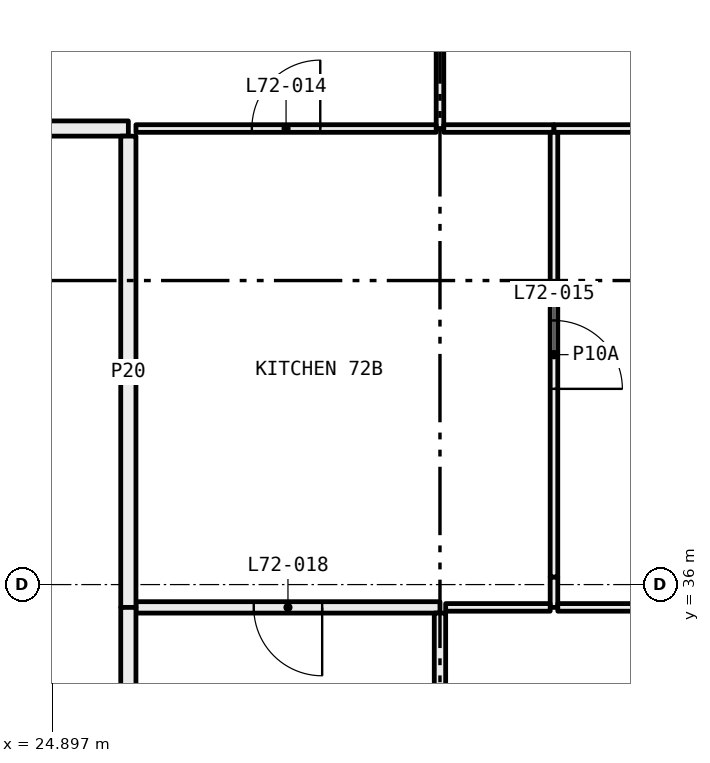
"""IFC4 building model, lengths in metres.
Left out: names, types, materials, properties, quantities, classifications, styles, units other than length and angle.
Written with IfcOpenShell. Run it as: python <this file> out.ifc"""

import sys

from ifc_helpers import new_model, si_unit, direction, frame, frame_2d, origin, place, context, subcontext, project, spatial, rectangle, extrude, element, fill, save


model = new_model("IFC4")
c1 = context("Model", 3, precision=1e-05, world=origin(), true_north=direction((0.0, 1.0)))
c2 = subcontext(c1, "Body", "Model", "MODEL_VIEW")
j1 = project(units=[si_unit("LENGTHUNIT", "METRE"), si_unit("PLANEANGLEUNIT", "RADIAN")], contexts=[c1])
p1 = place(None, origin())
s1 = spatial("IfcSite", under=j1, at=p1, CompositionType="ELEMENT")
p2 = place(p1, origin())
s2 = spatial("IfcBuilding", under=s1, at=p2, CompositionType="ELEMENT")
p3 = place(p2, frame((0.0, 0.0, 266.25)))
s3 = spatial("IfcBuildingStorey", under=s2, at=p3, CompositionType="ELEMENT", Elevation=266.25)
p4 = place(p3, frame((30.0, 42.0, 0.0), z_axis=(0.0, 0.0, 1.0), x_axis=(0.0, 1.0, 0.0)))
e1 = element("IfcWall", 1, at=p4, inside=s3, PredefinedType="PARTITIONING", context=c2, shape_type="SweptSolid", body=[
    extrude(rectangle(XDim=5.28, YDim=0.1, at=frame_2d((2.64, 0.0))), origin(), (0.0, 0.0, 1.0), 3.05),
])
p5 = place(p4, frame((2.19, 0.0, 0.0)))
e2 = element("IfcOpeningElement", 2, at=p5, cuts=e1, PredefinedType="OPENING", context=c2, shape_type="SweptSolid", body=[
    extrude(rectangle(XDim=0.9, YDim=2.1, at=frame_2d((0.45, 1.05))), frame((0.0, 0.06, 0.0), z_axis=(0.0, -1.0, 0.0), x_axis=(1.0, 0.0, 0.0)), (0.0, 0.0, 1.0), 0.12),
])
p6 = place(p3, frame((26.0, 42.0, 0.0), z_axis=(0.0, 0.0, 1.0), x_axis=(1.0, 0.0, 0.0)))
e3 = element("IfcWall", 3, at=p6, inside=s3, PredefinedType="PARTITIONING", context=c2, shape_type="SweptSolid", body=[
    extrude(rectangle(XDim=3.95, YDim=0.1, at=frame_2d((1.975, 0.0))), origin(), (0.0, 0.0, 1.0), 3.05),
])
p7 = place(p6, frame((1.525, 0.0, 0.0)))
e4 = element("IfcOpeningElement", 4, at=p7, cuts=e3, PredefinedType="OPENING", context=c2, shape_type="SweptSolid", body=[
    extrude(rectangle(XDim=0.9, YDim=2.1, at=frame_2d((0.45, 1.05))), frame((0.0, 0.06, 0.0), z_axis=(0.0, -1.0, 0.0), x_axis=(1.0, 0.0, 0.0)), (0.0, 0.0, 1.0), 0.12),
])
p8 = place(p3, frame((24.0, 42.0, 0.0), z_axis=(0.0, 0.0, 1.0), x_axis=(1.0, 0.0, 0.0)))
e5 = element("IfcWall", 5, at=p8, inside=s3, PredefinedType="PARTITIONING", context=c2, shape_type="SweptSolid", body=[
    extrude(rectangle(XDim=1.9, YDim=0.2, at=frame_2d((0.95, 0.0))), origin(), (0.0, 0.0, 1.0), 3.05),
])
p9 = place(p3, frame((30.05, 42.0, 0.0), z_axis=(0.0, 0.0, 1.0), x_axis=(1.0, 0.0, 0.0)))
e6 = element("IfcWall", 6, at=p9, inside=s3, PredefinedType="PARTITIONING", context=c2, shape_type="SweptSolid", body=[
    extrude(rectangle(XDim=1.45, YDim=0.1, at=frame_2d((0.725, 0.0))), origin(), (0.0, 0.0, 1.0), 3.05),
])
p10 = place(p3, frame((31.5, 42.0, 0.0), z_axis=(0.0, 0.0, 1.0), x_axis=(1.0, 0.0, 0.0)))
e7 = element("IfcWall", 7, at=p10, inside=s3, PredefinedType="PARTITIONING", context=c2, shape_type="SweptSolid", body=[
    extrude(rectangle(XDim=4.425, YDim=0.1, at=frame_2d((2.212, 0.0))), origin(), (0.0, 0.0, 1.0), 2.45),
])
p11 = place(p3, frame((31.5, 35.7, 0.0), z_axis=(0.0, 0.0, 1.0), x_axis=(0.0, 1.0, 0.0)))
e8 = element("IfcWall", 8, at=p11, inside=s3, PredefinedType="PARTITIONING", context=c2, shape_type="SweptSolid", body=[
    extrude(rectangle(XDim=0.4, YDim=0.1, at=frame_2d((0.2, 0.0))), origin(), (0.0, 0.0, 1.0), 2.45),
])
p12 = place(p3, frame((31.5, 36.1, 0.0), z_axis=(0.0, 0.0, 1.0), x_axis=(0.0, 1.0, 0.0)))
e9 = element("IfcWall", 9, at=p12, inside=s3, PredefinedType="PARTITIONING", context=c2, shape_type="SweptSolid", body=[
    extrude(rectangle(XDim=5.85, YDim=0.1, at=frame_2d((2.925, 0.0))), origin(), (0.0, 0.0, 1.0), 3.05),
])
p13 = place(p12, frame((2.475, 0.0, 0.0)))
e10 = element("IfcOpeningElement", 10, at=p13, cuts=e9, PredefinedType="OPENING", context=c2, shape_type="SweptSolid", body=[
    extrude(rectangle(XDim=0.9, YDim=2.1, at=frame_2d((0.45, 1.05))), frame((0.0, 0.06, 0.0), z_axis=(0.0, -1.0, 0.0), x_axis=(1.0, 0.0, 0.0)), (0.0, 0.0, 1.0), 0.12),
])
p14 = place(p3, frame((26.0, 35.7, 0.0), z_axis=(0.0, 0.0, 1.0), x_axis=(1.0, 0.0, 0.0)))
e11 = element("IfcWall", 11, at=p14, inside=s3, PredefinedType="PARTITIONING", context=c2, shape_type="SweptSolid", body=[
    extrude(rectangle(XDim=4.0, YDim=0.15, at=frame_2d((2.0, 0.0))), origin(), (0.0, 0.0, 1.0), 3.05),
])
p15 = place(p14, frame((1.55, 0.0, 0.0)))
e12 = element("IfcOpeningElement", 12, at=p15, cuts=e11, PredefinedType="OPENING", context=c2, shape_type="SweptSolid", body=[
    extrude(rectangle(XDim=0.9, YDim=2.1, at=frame_2d((0.45, 1.05))), frame((0.0, 0.085, 0.0), z_axis=(0.0, -1.0, 0.0), x_axis=(1.0, 0.0, 0.0)), (0.0, 0.0, 1.0), 0.17),
])
p16 = place(p3, frame((30.075, 35.7, 0.0), z_axis=(0.0, 0.0, 1.0), x_axis=(1.0, 0.0, 0.0)))
e13 = element("IfcWall", 13, at=p16, inside=s3, PredefinedType="PARTITIONING", context=c2, shape_type="SweptSolid", body=[
    extrude(rectangle(XDim=1.375, YDim=0.1, at=frame_2d((0.688, 0.0))), origin(), (0.0, 0.0, 1.0), 3.05),
])
p17 = place(p3, frame((25.9, 41.9, 0.0), z_axis=(0.0, 0.0, 1.0), x_axis=(0.0, -1.0, 0.0)))
e14 = element("IfcWall", 14, at=p17, inside=s3, PredefinedType="PARTITIONING", context=c2, shape_type="SweptSolid", body=[
    extrude(rectangle(XDim=6.2, YDim=0.2, at=frame_2d((3.1, 0.0))), origin(), (0.0, 0.0, 1.0), 2.45),
])
p18 = place(p3, frame((31.55, 35.7, 0.0), z_axis=(0.0, 0.0, 1.0), x_axis=(1.0, 0.0, 0.0)))
e15 = element("IfcWall", 15, at=p18, inside=s3, PredefinedType="PARTITIONING", context=c2, shape_type="SweptSolid", body=[
    extrude(rectangle(XDim=3.9, YDim=0.1, at=frame_2d((1.95, 0.0))), origin(), (0.0, 0.0, 1.0), 3.05),
])
p19 = place(p18, frame((1.5, 0.0, 0.0)))
e16 = element("IfcOpeningElement", 16, at=p19, cuts=e15, PredefinedType="OPENING", context=c2, shape_type="SweptSolid", body=[
    extrude(rectangle(XDim=0.9, YDim=2.1, at=frame_2d((0.45, 1.05))), frame((0.0, 0.06, 0.0), z_axis=(0.0, -1.0, 0.0), x_axis=(1.0, 0.0, 0.0)), (0.0, 0.0, 1.0), 0.12),
])
p20 = place(p3, frame((30.0, 31.3, 0.0), z_axis=(0.0, 0.0, 1.0), x_axis=(0.0, 1.0, 0.0)))
e17 = element("IfcWall", 17, at=p20, inside=s3, PredefinedType="PARTITIONING", context=c2, shape_type="SweptSolid", body=[
    extrude(rectangle(XDim=4.325, YDim=0.15, at=frame_2d((2.163, 0.0))), origin(), (0.0, 0.0, 1.0), 3.05),
])
p21 = place(p3, frame((25.9, 35.7, 0.0), z_axis=(0.0, 0.0, 1.0), x_axis=(0.0, -1.0, 0.0)))
e18 = element("IfcWall", 18, at=p21, inside=s3, PredefinedType="PARTITIONING", context=c2, shape_type="SweptSolid", body=[
    extrude(rectangle(XDim=4.5, YDim=0.2, at=frame_2d((2.25, 0.0))), origin(), (0.0, 0.0, 1.0), 3.05),
])
p22 = place(p7, origin())
e19 = element("IfcDoor", 19, at=p22, inside=s3, OperationType="SINGLE_SWING_LEFT", PredefinedType="DOOR", context=c2, shape_type="SweptSolid", body=[
    extrude(rectangle(XDim=0.9, YDim=2.1, at=frame_2d((0.45, 1.05))), frame((0.0, 0.025, 0.0), z_axis=(0.0, -1.0, 0.0), x_axis=(1.0, 0.0, 0.0)), (0.0, 0.0, 1.0), 0.05),
])
fill(e4, e19)
p23 = place(p13, frame((0.9, 0.0, 0.0), x_axis=(-1.0, 0.0, 0.0)))
e20 = element("IfcDoor", 20, at=p23, inside=s3, OperationType="SINGLE_SWING_LEFT", PredefinedType="DOOR", context=c2, shape_type="SweptSolid", body=[
    extrude(rectangle(XDim=0.9, YDim=2.1, at=frame_2d((0.45, 1.05))), frame((0.0, 0.025, 0.0), z_axis=(0.0, -1.0, 0.0), x_axis=(1.0, 0.0, 0.0)), (0.0, 0.0, 1.0), 0.05),
])
fill(e10, e20)
p24 = place(p15, frame((0.9, 0.0, 0.0), x_axis=(-1.0, 0.0, 0.0)))
e21 = element("IfcDoor", 21, at=p24, inside=s3, OperationType="SINGLE_SWING_RIGHT", PredefinedType="DOOR", context=c2, shape_type="SweptSolid", body=[
    extrude(rectangle(XDim=0.9, YDim=2.1, at=frame_2d((0.45, 1.05))), frame((0.0, 0.025, 0.0), z_axis=(0.0, -1.0, 0.0), x_axis=(1.0, 0.0, 0.0)), (0.0, 0.0, 1.0), 0.05),
])
fill(e12, e21)
save(model, sys.argv[1])
